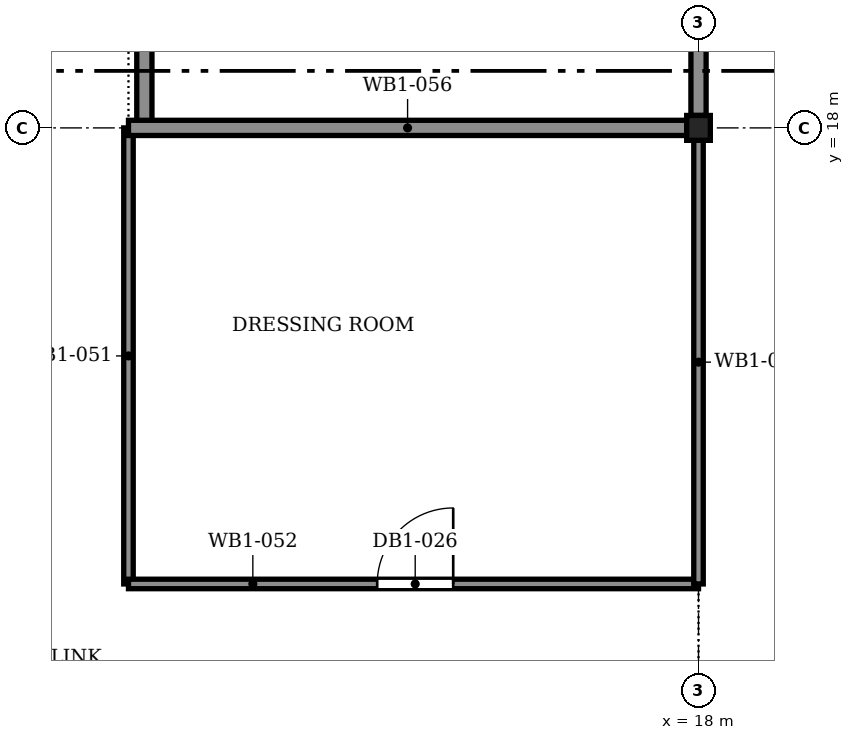
"""IFC4 building model, lengths in metres.
Left out: names, types, materials, properties, quantities, classifications, styles, units other than length and angle.
Written with IfcOpenShell. Run it as: python <this file> out.ifc"""

import sys

from ifc_helpers import new_model, si_unit, direction, frame, frame_2d, origin, origin_2d, place, context, subcontext, project, spatial, rectangle, i_section, extrude, element, fill, save


model = new_model("IFC4")
c1 = context("Model", 3, precision=1e-05, world=origin(), true_north=direction((0.0, 1.0)))
c2 = subcontext(c1, "Body", "Model", "MODEL_VIEW")
j1 = project(units=[si_unit("LENGTHUNIT", "METRE"), si_unit("PLANEANGLEUNIT", "RADIAN")], contexts=[c1])
p1 = place(None, origin())
s1 = spatial("IfcSite", under=j1, at=p1, CompositionType="ELEMENT")
p2 = place(p1, origin())
s2 = spatial("IfcBuilding", under=s1, at=p2, CompositionType="ELEMENT")
p3 = place(p2, frame((0.0, 0.0, -4.8)))
s3 = spatial("IfcBuildingStorey", under=s2, at=p3, CompositionType="ELEMENT", Elevation=-4.8)
p4 = place(p3, frame((18.0, 18.0, -0.6), z_axis=(0.0, 0.0, 1.0), x_axis=(1.0, 0.0, 0.0)))
e1 = element("IfcColumn", 1, at=p4, inside=s3, PredefinedType="COLUMN", context=c2, shape_type="SweptSolid", body=[
    extrude(i_section(OverallWidth=0.311, OverallDepth=0.327, WebThickness=0.016, FlangeThickness=0.025, FilletRadius=0.017, at=origin_2d()), origin(), (0.0, 0.0, 1.0), 5.4),
])
p5 = place(p3, frame((10.5, 12.0, 0.0), z_axis=(0.0, 0.0, 1.0), x_axis=(0.0, 1.0, 0.0)))
e2 = element("IfcWall", 2, at=p5, inside=s3, PredefinedType="PARTITIONING", context=c2, shape_type="SweptSolid", body=[
    extrude(rectangle(XDim=6.0, YDim=0.125, at=frame_2d((3.0, 0.0))), origin(), (0.0, 0.0, 1.0), 3.883),
])
p6 = place(p3, frame((10.5, 12.0, 0.0), z_axis=(0.0, 0.0, 1.0), x_axis=(1.0, 0.0, 0.0)))
e3 = element("IfcWall", 3, at=p6, inside=s3, PredefinedType="PARTITIONING", context=c2, shape_type="SweptSolid", body=[
    extrude(rectangle(XDim=7.5, YDim=0.125, at=frame_2d((3.75, 0.0))), origin(), (0.0, 0.0, 1.0), 4.023),
])
p7 = place(p6, frame((3.272, 0.0, 0.0)))
e4 = element("IfcOpeningElement", 4, at=p7, cuts=e3, PredefinedType="OPENING", context=c2, shape_type="SweptSolid", body=[
    extrude(rectangle(XDim=1.0, YDim=2.1, at=frame_2d((0.5, 1.05))), frame((0.0, 0.073, 0.0), z_axis=(0.0, -1.0, 0.0), x_axis=(1.0, 0.0, 0.0)), (0.0, 0.0, 1.0), 0.145),
])
p8 = place(p3, frame((10.709, 18.0, 0.0), z_axis=(0.0, 0.0, 1.0), x_axis=(0.0, 1.0, 0.0)))
e5 = element("IfcWall", 5, at=p8, inside=s3, PredefinedType="PARTITIONING", context=c2, shape_type="SweptSolid", body=[
    extrude(rectangle(XDim=18.0, YDim=0.2, at=frame_2d((9.0, 0.0))), origin(), (0.0, 0.0, 1.0), 2.6),
])
p9 = place(p8, frame((8.51, 0.0, 0.0)))
e6 = element("IfcOpeningElement", 6, at=p9, cuts=e5, PredefinedType="OPENING", context=c2, shape_type="SweptSolid", body=[
    extrude(rectangle(XDim=1.0, YDim=2.1, at=frame_2d((0.5, 1.05))), frame((0.0, 0.11, 0.0), z_axis=(0.0, -1.0, 0.0), x_axis=(1.0, 0.0, 0.0)), (0.0, 0.0, 1.0), 0.22),
])
p10 = place(p3, frame((10.5, 18.0, 0.0), z_axis=(0.0, 0.0, 1.0), x_axis=(1.0, 0.0, 0.0)))
e7 = element("IfcWall", 7, at=p10, inside=s3, PredefinedType="PARTITIONING", context=c2, shape_type="SweptSolid", body=[
    extrude(rectangle(XDim=7.344, YDim=0.2, at=frame_2d((3.672, 0.0))), origin(), (0.0, 0.0, 1.0), 2.6),
])
p11 = place(p3, frame((18.0, 12.0, 0.0), z_axis=(0.0, 0.0, 1.0), x_axis=(0.0, 1.0, 0.0)))
e8 = element("IfcWall", 8, at=p11, inside=s3, PredefinedType="PARTITIONING", context=c2, shape_type="SweptSolid", body=[
    extrude(rectangle(XDim=5.836, YDim=0.125, at=frame_2d((2.918, 0.0))), origin(), (0.0, 0.0, 1.0), 4.023),
])
p12 = place(p3, frame((18.0, 18.164, 0.0), z_axis=(0.0, 0.0, 1.0), x_axis=(0.0, 1.0, 0.0)))
e9 = element("IfcWall", 9, at=p12, inside=s3, PredefinedType="PARTITIONING", context=c2, shape_type="SweptSolid", body=[
    extrude(rectangle(XDim=8.963, YDim=0.2, at=frame_2d((4.482, 0.0))), origin(), (0.0, 0.0, 1.0), 2.6),
])
p13 = place(p7, origin())
e10 = element("IfcDoor", 10, at=p13, inside=s3, OperationType="SINGLE_SWING_LEFT", PredefinedType="DOOR", context=c2, shape_type="SweptSolid", body=[
    extrude(rectangle(XDim=1.0, YDim=2.1, at=frame_2d((0.5, 1.05))), frame((0.0, 0.025, 0.0), z_axis=(0.0, -1.0, 0.0), x_axis=(1.0, 0.0, 0.0)), (0.0, 0.0, 1.0), 0.05),
])
fill(e4, e10)
save(model, sys.argv[1])
